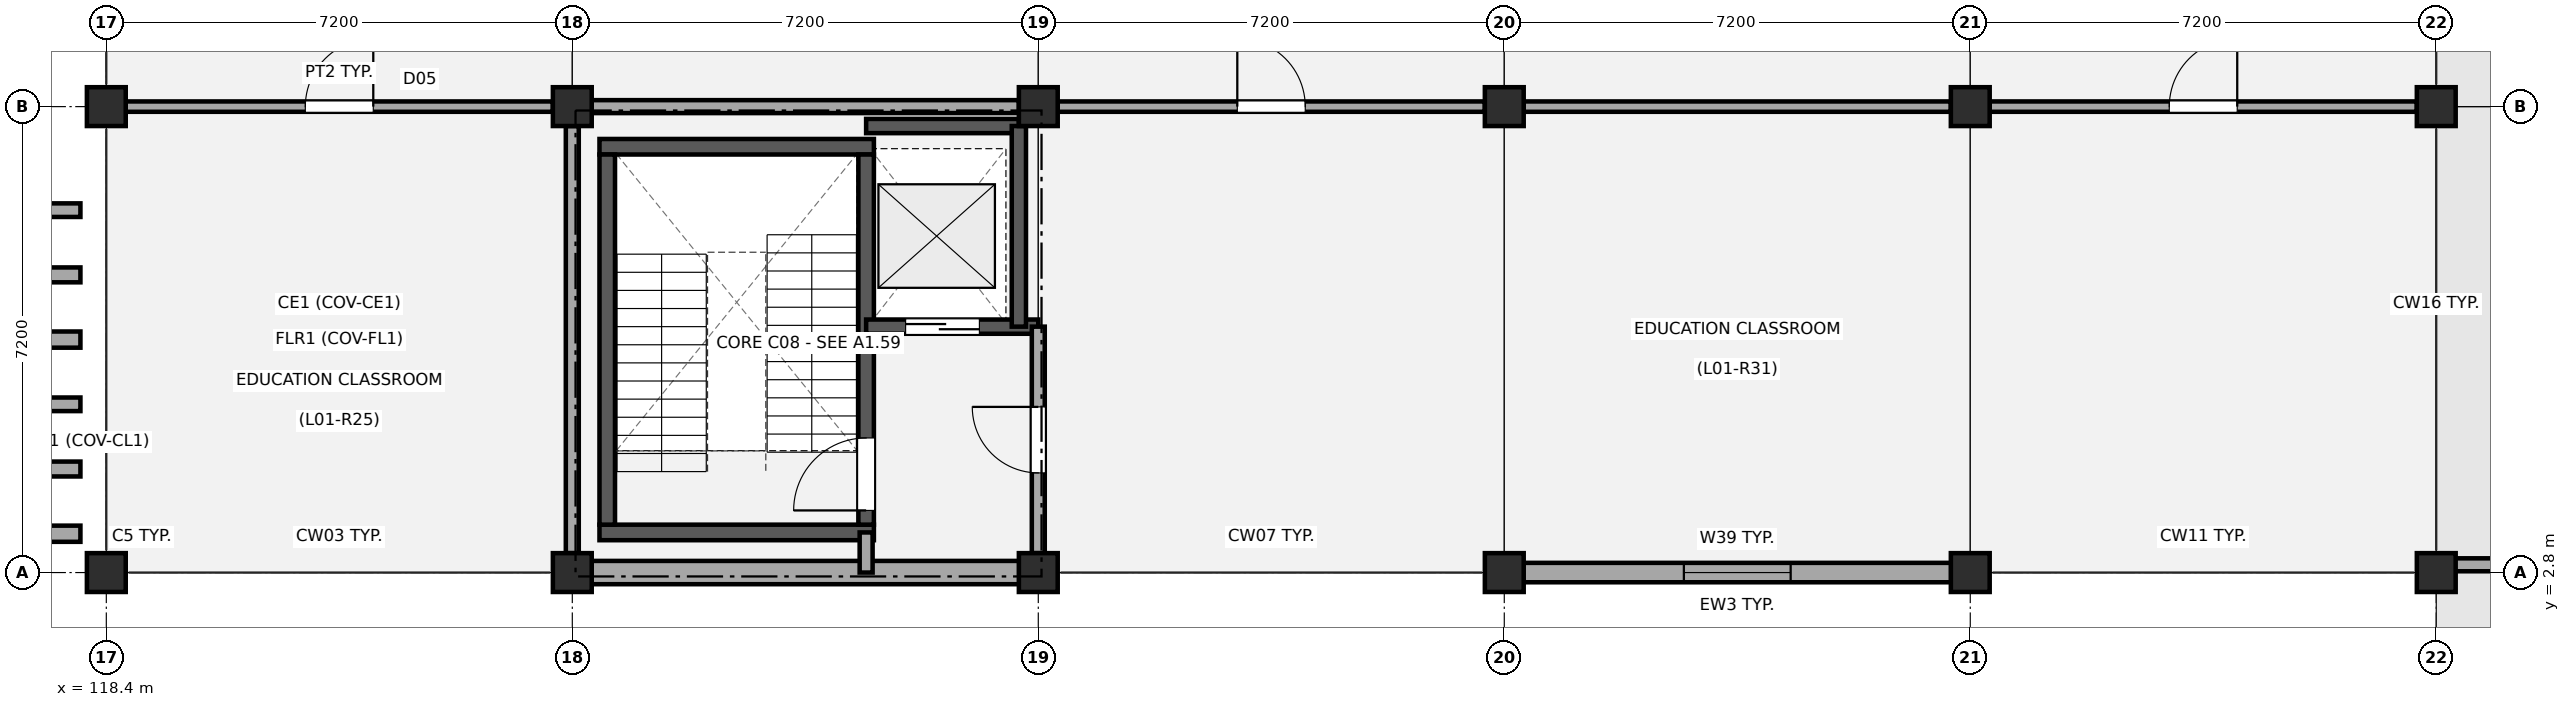
"""IFC4 building model, lengths in metres.
Left out: names, types, materials, properties, quantities, classifications, styles, units other than length and angle.
Written with IfcOpenShell. Run it as: python <this file> out.ifc"""

import sys

from ifc_helpers import new_model, si_unit, direction, frame, frame_2d, origin, origin_2d, place, context, subcontext, project, spatial, polyline, rectangle, outline, extrude, element, fill, save


model = new_model("IFC4")
c1 = context("Model", 3, precision=1e-05, world=origin(), true_north=direction((0.0, 1.0)))
c2 = subcontext(c1, "Body", "Model", "MODEL_VIEW")
j1 = project(units=[si_unit("LENGTHUNIT", "METRE"), si_unit("PLANEANGLEUNIT", "RADIAN")], contexts=[c1])
p1 = place(None, origin())
s1 = spatial("IfcSite", under=j1, at=p1, CompositionType="ELEMENT")
p2 = place(p1, origin())
s2 = spatial("IfcBuilding", under=s1, at=p2, CompositionType="ELEMENT")
p3 = place(p2, frame((0.0, 0.0, 4.68)))
s3 = spatial("IfcBuildingStorey", under=s2, at=p3, CompositionType="ELEMENT", Elevation=4.68)
for number, where, z_axis, x_axis in (
    (1, (118.4, 2.8, 0.0), (0.0, 0.0, 1.0), (1.0, 0.0, 0.0)),
    (2, (118.4, 10.0, 0.0), (0.0, 0.0, 1.0), (1.0, 0.0, 0.0)),
    (3, (125.6, 2.8, 0.0), (0.0, 0.0, 1.0), (1.0, 0.0, 0.0)),
    (4, (125.6, 10.0, 0.0), (0.0, 0.0, 1.0), (1.0, 0.0, 0.0)),
    (5, (132.8, 2.8, 0.0), (0.0, 0.0, 1.0), (1.0, 0.0, 0.0)),
    (6, (132.8, 10.0, 0.0), (0.0, 0.0, 1.0), (1.0, 0.0, 0.0)),
    (7, (140.0, 2.8, 0.0), (0.0, 0.0, 1.0), (1.0, 0.0, 0.0)),
    (8, (140.0, 10.0, 0.0), (0.0, 0.0, 1.0), (1.0, 0.0, 0.0)),
    (9, (147.2, 2.8, 0.0), (0.0, 0.0, 1.0), (1.0, 0.0, 0.0)),
    (10, (147.2, 10.0, 0.0), (0.0, 0.0, 1.0), (1.0, 0.0, 0.0)),
    (11, (154.4, 2.8, 0.0), (0.0, 0.0, 1.0), (1.0, 0.0, 0.0)),
    (12, (154.4, 10.0, 0.0), (0.0, 0.0, 1.0), (1.0, 0.0, 0.0)),
):
    element("IfcColumn", number, at=place(p3, frame(where, z_axis=z_axis, x_axis=x_axis)), inside=s3, PredefinedType="COLUMN", context=c2, shape_type="SweptSolid", body=[
        extrude(rectangle(XDim=0.6, YDim=0.6, at=origin_2d()), origin(), (0.0, 0.0, 1.0), 4.5),
    ])
p4 = place(p3, frame((132.505, 2.8, 0.0), z_axis=(0.0, 0.0, 1.0), x_axis=(-1.0, 0.0, 0.0)))
e13 = element("IfcWall", 13, at=p4, inside=s3, PredefinedType="STANDARD", context=c2, shape_type="SweptSolid", body=[
    extrude(rectangle(XDim=6.61, YDim=0.36, at=frame_2d((3.305, 0.0))), origin(), (0.0, 0.0, 1.0), 3.51),
])
p5 = place(p3, frame((146.905, 2.8, 0.0), z_axis=(0.0, 0.0, 1.0), x_axis=(-1.0, 0.0, 0.0)))
e14 = element("IfcWall", 14, at=p5, inside=s3, PredefinedType="STANDARD", context=c2, shape_type="SweptSolid", body=[
    extrude(rectangle(XDim=6.61, YDim=0.3, at=frame_2d((3.305, 0.0))), origin(), (0.0, 0.0, 1.0), 3.51),
])
p6 = place(p5, frame((2.48, 0.0, 0.95)))
e15 = element("IfcOpeningElement", 15, at=p6, cuts=e14, PredefinedType="OPENING", context=c2, shape_type="SweptSolid", body=[
    extrude(rectangle(XDim=1.65, YDim=1.85, at=frame_2d((0.825, 0.925))), frame((0.0, 0.16, 0.0), z_axis=(0.0, -1.0, 0.0), x_axis=(1.0, 0.0, 0.0)), (0.0, 0.0, 1.0), 0.32),
])
p7 = place(p3, frame((104.4, 3.4, -0.3), z_axis=(0.0, 0.0, 1.0), x_axis=(1.0, 0.0, 0.0)))
e16 = element("IfcWall", 16, at=p7, inside=s3, PredefinedType="PARAPET", context=c2, shape_type="SweptSolid", body=[
    extrude(outline(polyline([(0.0, 0.0), (13.6, 0.0), (13.6, 2.5), (10.2, 3.0), (6.8, 3.2), (3.4, 3.0), (0.0, 2.5), (0.0, 0.0)])), frame((0.0, 0.125, 0.0), z_axis=(0.0, -1.0, 0.0), x_axis=(1.0, 0.0, 0.0)), (0.0, 0.0, 1.0), 0.25),
])
p8 = place(p3, frame((104.4, 4.4, -0.3), z_axis=(0.0, 0.0, 1.0), x_axis=(1.0, 0.0, 0.0)))
e17 = element("IfcWall", 17, at=p8, inside=s3, PredefinedType="PARAPET", context=c2, shape_type="SweptSolid", body=[
    extrude(outline(polyline([(0.0, 0.0), (13.6, 0.0), (13.6, 2.26), (10.2, 2.76), (6.8, 2.96), (3.4, 2.76), (0.0, 2.26), (0.0, 0.0)])), frame((0.0, 0.115, 0.0), z_axis=(0.0, -1.0, 0.0), x_axis=(1.0, 0.0, 0.0)), (0.0, 0.0, 1.0), 0.23),
])
p9 = place(p3, frame((104.4, 5.4, -0.3), z_axis=(0.0, 0.0, 1.0), x_axis=(1.0, 0.0, 0.0)))
e18 = element("IfcWall", 18, at=p9, inside=s3, PredefinedType="PARAPET", context=c2, shape_type="SweptSolid", body=[
    extrude(outline(polyline([(0.0, 0.0), (13.6, 0.0), (13.6, 2.02), (10.2, 2.52), (6.8, 2.72), (3.4, 2.52), (0.0, 2.02), (0.0, 0.0)])), frame((0.0, 0.105, 0.0), z_axis=(0.0, -1.0, 0.0), x_axis=(1.0, 0.0, 0.0)), (0.0, 0.0, 1.0), 0.21),
])
p10 = place(p3, frame((104.4, 6.4, -0.3), z_axis=(0.0, 0.0, 1.0), x_axis=(1.0, 0.0, 0.0)))
e19 = element("IfcWall", 19, at=p10, inside=s3, PredefinedType="PARAPET", context=c2, shape_type="SweptSolid", body=[
    extrude(outline(polyline([(0.0, 0.0), (13.6, 0.0), (13.6, 1.78), (10.2, 2.28), (6.8, 2.48), (3.4, 2.28), (0.0, 1.78), (0.0, 0.0)])), frame((0.0, 0.125, 0.0), z_axis=(0.0, -1.0, 0.0), x_axis=(1.0, 0.0, 0.0)), (0.0, 0.0, 1.0), 0.25),
])
p11 = place(p3, frame((104.4, 7.4, -0.3), z_axis=(0.0, 0.0, 1.0), x_axis=(1.0, 0.0, 0.0)))
e20 = element("IfcWall", 20, at=p11, inside=s3, PredefinedType="PARAPET", context=c2, shape_type="SweptSolid", body=[
    extrude(outline(polyline([(0.0, 0.0), (13.6, 0.0), (13.6, 1.54), (10.2, 2.04), (6.8, 2.24), (3.4, 2.04), (0.0, 1.54), (0.0, 0.0)])), frame((0.0, 0.115, 0.0), z_axis=(0.0, -1.0, 0.0), x_axis=(1.0, 0.0, 0.0)), (0.0, 0.0, 1.0), 0.23),
])
p12 = place(p3, frame((104.4, 8.4, -0.3), z_axis=(0.0, 0.0, 1.0), x_axis=(1.0, 0.0, 0.0)))
e21 = element("IfcWall", 21, at=p12, inside=s3, PredefinedType="PARAPET", context=c2, shape_type="SweptSolid", body=[
    extrude(outline(polyline([(0.0, 0.0), (13.6, 0.0), (13.6, 1.3), (10.2, 1.8), (6.8, 2.0), (3.4, 1.8), (0.0, 1.3), (0.0, 0.0)])), frame((0.0, 0.105, 0.0), z_axis=(0.0, -1.0, 0.0), x_axis=(1.0, 0.0, 0.0)), (0.0, 0.0, 1.0), 0.21),
])
p13 = place(p3, frame((154.4, 2.92, 0.0), z_axis=(0.0, 0.0, 1.0), x_axis=(1.0, 0.0, 0.0)))
e22 = element("IfcWall", 22, at=p13, inside=s3, PredefinedType="PARAPET", context=c2, shape_type="SweptSolid", body=[
    extrude(rectangle(XDim=7.2, YDim=0.2, at=frame_2d((3.6, 0.0))), origin(), (0.0, 0.0, 1.0), 0.72),
])
for number, where, z_axis, x_axis in (
    (23, (126.02, 3.42, 0.0), (0.0, 0.0, 1.0), (1.0, 0.0, 0.0)),
    (24, (126.02, 9.38, 0.0), (0.0, 0.0, 1.0), (1.0, 0.0, 0.0)),
):
    element("IfcWall", number, at=place(p3, frame(where, z_axis=z_axis, x_axis=x_axis)), inside=s3, PredefinedType="SHEAR", context=c2, shape_type="SweptSolid", body=[
        extrude(rectangle(XDim=4.24, YDim=0.24, at=frame_2d((2.12, 0.0))), origin(), (0.0, 0.0, 1.0), 4.22),
    ])
p14 = place(p3, frame((126.14, 3.54, 0.0), z_axis=(0.0, 0.0, 1.0), x_axis=(0.0, 1.0, 0.0)))
e25 = element("IfcWall", 25, at=p14, inside=s3, PredefinedType="SHEAR", context=c2, shape_type="SweptSolid", body=[
    extrude(rectangle(XDim=5.72, YDim=0.24, at=frame_2d((2.86, 0.0))), origin(), (0.0, 0.0, 1.0), 4.22),
])
p15 = place(p3, frame((130.14, 3.54, 0.0), z_axis=(0.0, 0.0, 1.0), x_axis=(0.0, 1.0, 0.0)))
e26 = element("IfcWall", 26, at=p15, inside=s3, PredefinedType="SHEAR", context=c2, shape_type="SweptSolid", body=[
    extrude(rectangle(XDim=5.72, YDim=0.24, at=frame_2d((2.86, 0.0))), origin(), (0.0, 0.0, 1.0), 4.22),
])
p16 = place(p15, frame((0.22, 0.0, 0.0)))
e27 = element("IfcOpeningElement", 27, at=p16, cuts=e26, PredefinedType="OPENING", context=c2, shape_type="SweptSolid", body=[
    extrude(rectangle(XDim=1.12, YDim=2.15, at=frame_2d((0.56, 1.075))), frame((0.0, 0.13, 0.0), z_axis=(0.0, -1.0, 0.0), x_axis=(1.0, 0.0, 0.0)), (0.0, 0.0, 1.0), 0.26),
])
p17 = place(p3, frame((130.14, 6.6, 0.0), z_axis=(0.0, 0.0, 1.0), x_axis=(1.0, 0.0, 0.0)))
e28 = element("IfcWall", 28, at=p17, inside=s3, PredefinedType="SHEAR", context=c2, shape_type="SweptSolid", body=[
    extrude(rectangle(XDim=2.66, YDim=0.22, at=frame_2d((1.33, 0.0))), origin(), (0.0, 0.0, 1.0), 4.22),
])
p18 = place(p17, frame((0.61, 0.0, 0.0)))
e29 = element("IfcOpeningElement", 29, at=p18, cuts=e28, PredefinedType="OPENING", context=c2, shape_type="SweptSolid", body=[
    extrude(rectangle(XDim=1.14, YDim=2.15, at=frame_2d((0.57, 1.075))), frame((0.0, 0.12, 0.0), z_axis=(0.0, -1.0, 0.0), x_axis=(1.0, 0.0, 0.0)), (0.0, 0.0, 1.0), 0.24),
])
p19 = place(p3, frame((130.14, 9.7, 0.0), z_axis=(0.0, 0.0, 1.0), x_axis=(1.0, 0.0, 0.0)))
e30 = element("IfcWall", 30, at=p19, inside=s3, PredefinedType="SHEAR", context=c2, shape_type="SweptSolid", body=[
    extrude(rectangle(XDim=2.36, YDim=0.22, at=frame_2d((1.18, 0.0))), origin(), (0.0, 0.0, 1.0), 4.22),
])
p20 = place(p3, frame((132.5, 6.6, 0.0), z_axis=(0.0, 0.0, 1.0), x_axis=(0.0, 1.0, 0.0)))
e31 = element("IfcWall", 31, at=p20, inside=s3, PredefinedType="SHEAR", context=c2, shape_type="SweptSolid", body=[
    extrude(rectangle(XDim=3.1, YDim=0.22, at=frame_2d((1.55, 0.0))), origin(), (0.0, 0.0, 1.0), 4.22),
])
p21 = place(p3, frame((130.14, 2.8, 0.0), z_axis=(0.0, 0.0, 1.0), x_axis=(0.0, 1.0, 0.0)))
e32 = element("IfcWall", 32, at=p21, inside=s3, PredefinedType="PARTITIONING", context=c2, shape_type="SweptSolid", body=[
    extrude(rectangle(XDim=0.62, YDim=0.2, at=frame_2d((0.31, 0.0))), origin(), (0.0, 0.0, 1.0), 3.51),
])
p22 = place(p3, frame((125.6, 3.1, 0.0), z_axis=(0.0, 0.0, 1.0), x_axis=(0.0, 1.0, 0.0)))
e33 = element("IfcWall", 33, at=p22, inside=s3, PredefinedType="PARTITIONING", context=c2, shape_type="SweptSolid", body=[
    extrude(rectangle(XDim=6.6, YDim=0.2, at=frame_2d((3.3, 0.0))), origin(), (0.0, 0.0, 1.0), 3.54),
])
p23 = place(p3, frame((132.8, 3.1, 0.0), z_axis=(0.0, 0.0, 1.0), x_axis=(0.0, 1.0, 0.0)))
e34 = element("IfcWall", 34, at=p23, inside=s3, PredefinedType="PARTITIONING", context=c2, shape_type="SweptSolid", body=[
    extrude(rectangle(XDim=3.5, YDim=0.2, at=frame_2d((1.75, 0.0))), origin(), (0.0, 0.0, 1.0), 3.54),
])
p24 = place(p23, frame((1.24, 0.0, 0.0)))
e35 = element("IfcOpeningElement", 35, at=p24, cuts=e34, PredefinedType="OPENING", context=c2, shape_type="SweptSolid", body=[
    extrude(rectangle(XDim=1.02, YDim=2.15, at=frame_2d((0.51, 1.075))), frame((0.0, 0.11, 0.0), z_axis=(0.0, -1.0, 0.0), x_axis=(1.0, 0.0, 0.0)), (0.0, 0.0, 1.0), 0.22),
])
p25 = place(p3, frame((125.9, 10.0, 0.0), z_axis=(0.0, 0.0, 1.0), x_axis=(1.0, 0.0, 0.0)))
e36 = element("IfcWall", 36, at=p25, inside=s3, PredefinedType="PARTITIONING", context=c2, shape_type="SweptSolid", body=[
    extrude(rectangle(XDim=6.6, YDim=0.2, at=frame_2d((3.3, 0.0))), origin(), (0.0, 0.0, 1.0), 3.54),
])
p26 = place(p3, frame((118.7, 10.0, 0.0), z_axis=(0.0, 0.0, 1.0), x_axis=(1.0, 0.0, 0.0)))
e37 = element("IfcWall", 37, at=p26, inside=s3, PredefinedType="PARTITIONING", context=c2, shape_type="SweptSolid", body=[
    extrude(rectangle(XDim=6.6, YDim=0.16, at=frame_2d((3.3, 0.0))), origin(), (0.0, 0.0, 1.0), 3.59),
])
p27 = place(p26, frame((2.775, 0.0, 0.0)))
e38 = element("IfcOpeningElement", 38, at=p27, cuts=e37, PredefinedType="OPENING", context=c2, shape_type="SweptSolid", body=[
    extrude(rectangle(XDim=1.05, YDim=2.14, at=frame_2d((0.525, 1.07))), frame((0.0, 0.09, 0.0), z_axis=(0.0, -1.0, 0.0), x_axis=(1.0, 0.0, 0.0)), (0.0, 0.0, 1.0), 0.18),
])
p28 = place(p3, frame((133.1, 10.0, 0.0), z_axis=(0.0, 0.0, 1.0), x_axis=(1.0, 0.0, 0.0)))
e39 = element("IfcWall", 39, at=p28, inside=s3, PredefinedType="PARTITIONING", context=c2, shape_type="SweptSolid", body=[
    extrude(rectangle(XDim=6.6, YDim=0.16, at=frame_2d((3.3, 0.0))), origin(), (0.0, 0.0, 1.0), 3.59),
])
p29 = place(p28, frame((2.775, 0.0, 0.0)))
e40 = element("IfcOpeningElement", 40, at=p29, cuts=e39, PredefinedType="OPENING", context=c2, shape_type="SweptSolid", body=[
    extrude(rectangle(XDim=1.05, YDim=2.14, at=frame_2d((0.525, 1.07))), frame((0.0, 0.09, 0.0), z_axis=(0.0, -1.0, 0.0), x_axis=(1.0, 0.0, 0.0)), (0.0, 0.0, 1.0), 0.18),
])
p30 = place(p3, frame((140.3, 10.0, 0.0), z_axis=(0.0, 0.0, 1.0), x_axis=(1.0, 0.0, 0.0)))
e41 = element("IfcWall", 41, at=p30, inside=s3, PredefinedType="PARTITIONING", context=c2, shape_type="SweptSolid", body=[
    extrude(rectangle(XDim=6.6, YDim=0.16, at=frame_2d((3.3, 0.0))), origin(), (0.0, 0.0, 1.0), 3.54),
])
p31 = place(p3, frame((147.5, 10.0, 0.0), z_axis=(0.0, 0.0, 1.0), x_axis=(1.0, 0.0, 0.0)))
e42 = element("IfcWall", 42, at=p31, inside=s3, PredefinedType="PARTITIONING", context=c2, shape_type="SweptSolid", body=[
    extrude(rectangle(XDim=6.6, YDim=0.16, at=frame_2d((3.3, 0.0))), origin(), (0.0, 0.0, 1.0), 3.59),
])
p32 = place(p31, frame((2.775, 0.0, 0.0)))
e43 = element("IfcOpeningElement", 43, at=p32, cuts=e42, PredefinedType="OPENING", context=c2, shape_type="SweptSolid", body=[
    extrude(rectangle(XDim=1.05, YDim=2.14, at=frame_2d((0.525, 1.07))), frame((0.0, 0.09, 0.0), z_axis=(0.0, -1.0, 0.0), x_axis=(1.0, 0.0, 0.0)), (0.0, 0.0, 1.0), 0.18),
])
p33 = place(p6, origin())
e44 = element("IfcWindow", 44, at=p33, inside=s3, PartitioningType="SINGLE_PANEL", PredefinedType="WINDOW", context=c2, shape_type="SweptSolid", body=[
    extrude(rectangle(XDim=1.65, YDim=1.85, at=frame_2d((0.825, 0.925))), frame((0.0, 0.03, 0.0), z_axis=(0.0, -1.0, 0.0), x_axis=(1.0, 0.0, 0.0)), (0.0, 0.0, 1.0), 0.06),
])
fill(e15, e44)
p34 = place(p16, origin())
e45 = element("IfcDoor", 45, at=p34, inside=s3, OperationType="SINGLE_SWING_LEFT", PredefinedType="DOOR", context=c2, shape_type="SweptSolid", body=[
    extrude(rectangle(XDim=1.12, YDim=2.15, at=frame_2d((0.56, 1.075))), frame((0.0, 0.025, 0.0), z_axis=(0.0, -1.0, 0.0), x_axis=(1.0, 0.0, 0.0)), (0.0, 0.0, 1.0), 0.05),
])
fill(e27, e45)
p35 = place(p18, origin())
e46 = element("IfcDoor", 46, at=p35, inside=s3, OperationType="SLIDING_TO_LEFT", PredefinedType="DOOR", context=c2, shape_type="SweptSolid", body=[
    extrude(rectangle(XDim=1.14, YDim=2.15, at=frame_2d((0.57, 1.075))), frame((0.0, 0.025, 0.0), z_axis=(0.0, -1.0, 0.0), x_axis=(1.0, 0.0, 0.0)), (0.0, 0.0, 1.0), 0.05),
])
fill(e29, e46)
p36 = place(p24, origin())
e47 = element("IfcDoor", 47, at=p36, inside=s3, OperationType="SINGLE_SWING_RIGHT", PredefinedType="DOOR", context=c2, shape_type="SweptSolid", body=[
    extrude(rectangle(XDim=1.02, YDim=2.15, at=frame_2d((0.51, 1.075))), frame((0.0, 0.025, 0.0), z_axis=(0.0, -1.0, 0.0), x_axis=(1.0, 0.0, 0.0)), (0.0, 0.0, 1.0), 0.05),
])
fill(e35, e47)
p37 = place(p27, origin())
e48 = element("IfcDoor", 48, at=p37, inside=s3, OperationType="SINGLE_SWING_RIGHT", PredefinedType="DOOR", context=c2, shape_type="SweptSolid", body=[
    extrude(rectangle(XDim=1.05, YDim=2.14, at=frame_2d((0.525, 1.07))), frame((0.0, 0.025, 0.0), z_axis=(0.0, -1.0, 0.0), x_axis=(1.0, 0.0, 0.0)), (0.0, 0.0, 1.0), 0.05),
])
fill(e38, e48)
p38 = place(p29, origin())
e49 = element("IfcDoor", 49, at=p38, inside=s3, OperationType="SINGLE_SWING_LEFT", PredefinedType="DOOR", context=c2, shape_type="SweptSolid", body=[
    extrude(rectangle(XDim=1.05, YDim=2.14, at=frame_2d((0.525, 1.07))), frame((0.0, 0.025, 0.0), z_axis=(0.0, -1.0, 0.0), x_axis=(1.0, 0.0, 0.0)), (0.0, 0.0, 1.0), 0.05),
])
fill(e40, e49)
p39 = place(p32, origin())
e50 = element("IfcDoor", 50, at=p39, inside=s3, OperationType="SINGLE_SWING_RIGHT", PredefinedType="DOOR", context=c2, shape_type="SweptSolid", body=[
    extrude(rectangle(XDim=1.05, YDim=2.14, at=frame_2d((0.525, 1.07))), frame((0.0, 0.025, 0.0), z_axis=(0.0, -1.0, 0.0), x_axis=(1.0, 0.0, 0.0)), (0.0, 0.0, 1.0), 0.05),
])
fill(e43, e50)
save(model, sys.argv[1])
